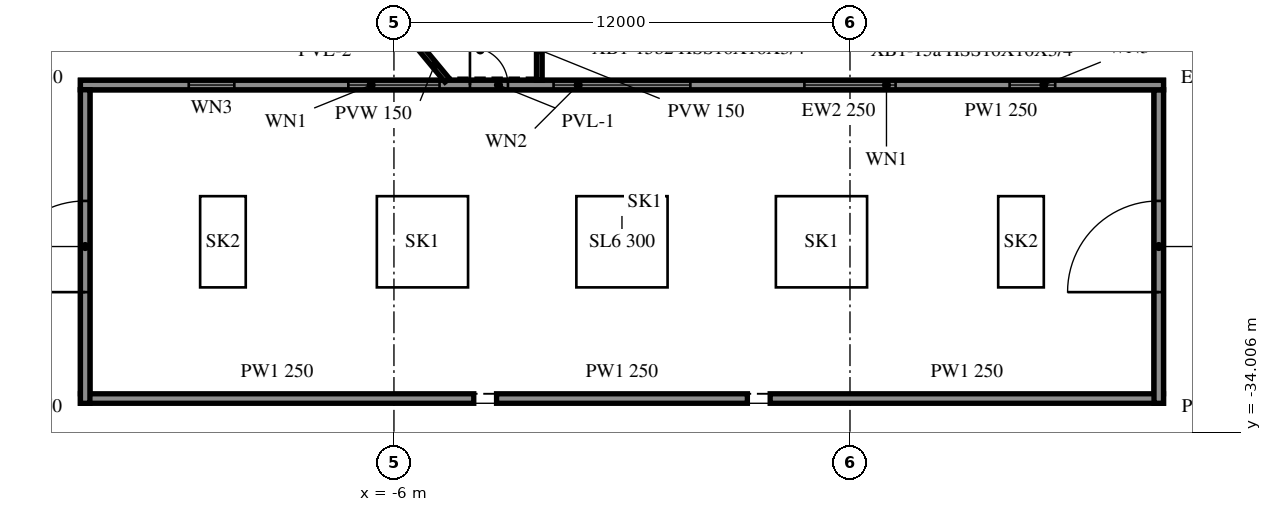
"""IFC4 building model, lengths in metres.
Left out: names, types, materials, properties, quantities, classifications, styles, units other than length and angle.
Written with IfcOpenShell. Run it as: python <this file> out.ifc"""

import sys

from ifc_helpers import new_model, si_unit, direction, frame, frame_2d, origin, origin_2d, place, context, subcontext, project, spatial, rectangle, extrude, element, fill, save


model = new_model("IFC4")
c1 = context("Model", 3, precision=1e-05, world=origin(), true_north=direction((0.0, 1.0)))
c2 = subcontext(c1, "Body", "Model", "MODEL_VIEW")
j1 = project(units=[si_unit("LENGTHUNIT", "METRE"), si_unit("PLANEANGLEUNIT", "RADIAN")], contexts=[c1])
p1 = place(None, origin())
s1 = spatial("IfcSite", under=j1, at=p1, CompositionType="ELEMENT")
p2 = place(p1, origin())
s2 = spatial("IfcBuilding", under=s1, at=p2, CompositionType="ELEMENT")
p3 = place(p2, frame((0.0, 0.0, 7.2)))
s3 = spatial("IfcBuildingStorey", under=s2, at=p3, CompositionType="ELEMENT", Elevation=7.2)
p4 = place(p3, frame((-14.25, -24.875, 0.0), z_axis=(0.0, 0.0, 1.0), x_axis=(1.0, 0.0, 0.0)))
e1 = element("IfcWall", 1, at=p4, inside=s3, PredefinedType="SOLIDWALL", context=c2, shape_type="SweptSolid", body=[
    extrude(rectangle(XDim=28.5, YDim=0.25, at=frame_2d((14.25, 0.0))), origin(), (0.0, 0.0, 1.0), 4.0),
])
p5 = place(p4, frame((2.85, 0.0, 0.9)))
e2 = element("IfcOpeningElement", 2, at=p5, cuts=e1, PredefinedType="OPENING", context=c2, shape_type="SweptSolid", body=[
    extrude(rectangle(XDim=1.2, YDim=2.0, at=frame_2d((0.6, 1.0))), frame((0.0, 0.135, 0.0), z_axis=(0.0, -1.0, 0.0), x_axis=(1.0, 0.0, 0.0)), (0.0, 0.0, 1.0), 0.27),
])
p6 = place(p4, frame((7.05, 0.0, 0.9)))
e3 = element("IfcOpeningElement", 3, at=p6, cuts=e1, PredefinedType="OPENING", context=c2, shape_type="SweptSolid", body=[
    extrude(rectangle(XDim=2.4, YDim=2.0, at=frame_2d((1.2, 1.0))), frame((0.0, 0.135, 0.0), z_axis=(0.0, -1.0, 0.0), x_axis=(1.0, 0.0, 0.0)), (0.0, 0.0, 1.0), 0.27),
])
p7 = place(p4, frame((12.45, 0.0, 0.9)))
e4 = element("IfcOpeningElement", 4, at=p7, cuts=e1, PredefinedType="OPENING", context=c2, shape_type="SweptSolid", body=[
    extrude(rectangle(XDim=3.6, YDim=2.0, at=frame_2d((1.8, 1.0))), frame((0.0, 0.135, 0.0), z_axis=(0.0, -1.0, 0.0), x_axis=(1.0, 0.0, 0.0)), (0.0, 0.0, 1.0), 0.27),
])
p8 = place(p4, frame((19.05, 0.0, 0.9)))
e5 = element("IfcOpeningElement", 5, at=p8, cuts=e1, PredefinedType="OPENING", context=c2, shape_type="SweptSolid", body=[
    extrude(rectangle(XDim=2.4, YDim=2.0, at=frame_2d((1.2, 1.0))), frame((0.0, 0.135, 0.0), z_axis=(0.0, -1.0, 0.0), x_axis=(1.0, 0.0, 0.0)), (0.0, 0.0, 1.0), 0.27),
])
p9 = place(p4, frame((24.45, 0.0, 0.9)))
e6 = element("IfcOpeningElement", 6, at=p9, cuts=e1, PredefinedType="OPENING", context=c2, shape_type="SweptSolid", body=[
    extrude(rectangle(XDim=1.2, YDim=2.0, at=frame_2d((0.6, 1.0))), frame((0.0, 0.135, 0.0), z_axis=(0.0, -1.0, 0.0), x_axis=(1.0, 0.0, 0.0)), (0.0, 0.0, 1.0), 0.27),
])
p10 = place(p4, frame((10.25, 0.0, 0.0)))
e7 = element("IfcOpeningElement", 7, at=p10, cuts=e1, PredefinedType="OPENING", context=c2, shape_type="SweptSolid", body=[
    extrude(rectangle(XDim=1.0, YDim=2.1, at=frame_2d((0.5, 1.05))), frame((0.0, 0.135, 0.0), z_axis=(0.0, -1.0, 0.0), x_axis=(1.0, 0.0, 0.0)), (0.0, 0.0, 1.0), 0.27),
])
p11 = place(p3, frame((-14.125, -33.25, 0.0), z_axis=(0.0, 0.0, 1.0), x_axis=(0.0, 1.0, 0.0)))
e8 = element("IfcWall", 8, at=p11, inside=s3, PredefinedType="SOLIDWALL", context=c2, shape_type="SweptSolid", body=[
    extrude(rectangle(XDim=8.25, YDim=0.25, at=frame_2d((4.125, 0.0))), origin(), (0.0, 0.0, 1.0), 4.0),
])
p12 = place(p11, frame((2.925, 0.0, 0.0)))
e9 = element("IfcOpeningElement", 9, at=p12, cuts=e8, PredefinedType="OPENING", context=c2, shape_type="SweptSolid", body=[
    extrude(rectangle(XDim=2.4, YDim=2.7, at=frame_2d((1.2, 1.35))), frame((0.0, 0.135, 0.0), z_axis=(0.0, -1.0, 0.0), x_axis=(1.0, 0.0, 0.0)), (0.0, 0.0, 1.0), 0.27),
])
p13 = place(p3, frame((14.125, -33.25, 0.0), z_axis=(0.0, 0.0, 1.0), x_axis=(0.0, 1.0, 0.0)))
e10 = element("IfcWall", 10, at=p13, inside=s3, PredefinedType="SOLIDWALL", context=c2, shape_type="SweptSolid", body=[
    extrude(rectangle(XDim=8.25, YDim=0.25, at=frame_2d((4.125, 0.0))), origin(), (0.0, 0.0, 1.0), 4.0),
])
p14 = place(p13, frame((2.925, 0.0, 0.0)))
e11 = element("IfcOpeningElement", 11, at=p14, cuts=e10, PredefinedType="OPENING", context=c2, shape_type="SweptSolid", body=[
    extrude(rectangle(XDim=2.4, YDim=2.7, at=frame_2d((1.2, 1.35))), frame((0.0, 0.135, 0.0), z_axis=(0.0, -1.0, 0.0), x_axis=(1.0, 0.0, 0.0)), (0.0, 0.0, 1.0), 0.27),
])
p15 = place(p3, frame((-14.25, -24.875, 4.3), z_axis=(0.0, 0.0, 1.0), x_axis=(1.0, 0.0, 0.0)))
e12 = element("IfcWall", 12, at=p15, inside=s3, PredefinedType="PARAPET", context=c2, shape_type="SweptSolid", body=[
    extrude(rectangle(XDim=28.5, YDim=0.25, at=frame_2d((14.25, 0.0))), origin(), (0.0, 0.0, 1.0), 0.6),
])
for number, where, z_axis, x_axis in (
    (13, (-14.125, -33.0, 4.3), (0.0, 0.0, 1.0), (0.0, 1.0, 0.0)),
    (14, (14.125, -33.0, 4.3), (0.0, 0.0, 1.0), (0.0, 1.0, 0.0)),
):
    element("IfcWall", number, at=place(p3, frame(where, z_axis=z_axis, x_axis=x_axis)), inside=s3, PredefinedType="PARAPET", context=c2, shape_type="SweptSolid", body=[
        extrude(rectangle(XDim=8.0, YDim=0.25, at=frame_2d((4.0, 0.0))), origin(), (0.0, 0.0, 1.0), 0.6),
    ])
p16 = place(p3, frame((-14.25, -33.125, 4.3), z_axis=(0.0, 0.0, 1.0), x_axis=(1.0, 0.0, 0.0)))
e15 = element("IfcWall", 15, at=p16, inside=s3, PredefinedType="PARAPET", context=c2, shape_type="SweptSolid", body=[
    extrude(rectangle(XDim=10.35, YDim=0.25, at=frame_2d((5.175, 0.0))), origin(), (0.0, 0.0, 1.0), 0.6),
])
p17 = place(p3, frame((-3.3, -33.125, 4.3), z_axis=(0.0, 0.0, 1.0), x_axis=(1.0, 0.0, 0.0)))
e16 = element("IfcWall", 16, at=p17, inside=s3, PredefinedType="PARAPET", context=c2, shape_type="SweptSolid", body=[
    extrude(rectangle(XDim=6.6, YDim=0.25, at=frame_2d((3.3, 0.0))), origin(), (0.0, 0.0, 1.0), 0.6),
])
p18 = place(p3, frame((3.9, -33.125, 4.3), z_axis=(0.0, 0.0, 1.0), x_axis=(1.0, 0.0, 0.0)))
e17 = element("IfcWall", 17, at=p18, inside=s3, PredefinedType="PARAPET", context=c2, shape_type="SweptSolid", body=[
    extrude(rectangle(XDim=10.35, YDim=0.25, at=frame_2d((5.175, 0.0))), origin(), (0.0, 0.0, 1.0), 0.6),
])
p19 = place(p3, frame((-4.6, -24.75, 0.0), z_axis=(0.0, 0.0, 1.0), x_axis=(-0.637776936143, 0.770221123914, 0.0)))
e18 = element("IfcWall", 18, at=p19, inside=s3, PredefinedType="SOLIDWALL", context=c2, shape_type="SweptSolid", body=[
    extrude(rectangle(XDim=2.077, YDim=0.15, at=frame_2d((1.039, 0.0))), origin(), (0.0, 0.0, 1.0), 3.8),
])
p20 = place(p3, frame((-2.175, -24.75, 0.0), z_axis=(0.0, 0.0, 1.0), x_axis=(0.0, 1.0, 0.0)))
e19 = element("IfcWall", 19, at=p20, inside=s3, PredefinedType="SOLIDWALL", context=c2, shape_type="SweptSolid", body=[
    extrude(rectangle(XDim=1.6, YDim=0.15, at=frame_2d((0.8, 0.0))), origin(), (0.0, 0.0, 1.0), 3.8),
])
p21 = place(p12, origin())
e20 = element("IfcDoor", 20, at=p21, inside=s3, OperationType="SINGLE_SWING_LEFT", PredefinedType="DOOR", context=c2, shape_type="SweptSolid", body=[
    extrude(rectangle(XDim=2.4, YDim=2.7, at=frame_2d((1.2, 1.35))), frame((0.0, 0.025, 0.0), z_axis=(0.0, -1.0, 0.0), x_axis=(1.0, 0.0, 0.0)), (0.0, 0.0, 1.0), 0.05),
])
fill(e9, e20)
p22 = place(p14, origin())
e21 = element("IfcDoor", 21, at=p22, inside=s3, OperationType="SINGLE_SWING_LEFT", PredefinedType="DOOR", context=c2, shape_type="SweptSolid", body=[
    extrude(rectangle(XDim=2.4, YDim=2.7, at=frame_2d((1.2, 1.35))), frame((0.0, 0.025, 0.0), z_axis=(0.0, -1.0, 0.0), x_axis=(1.0, 0.0, 0.0)), (0.0, 0.0, 1.0), 0.05),
])
fill(e11, e21)
p23 = place(p5, origin())
e22 = element("IfcWindow", 22, at=p23, inside=s3, PartitioningType="SINGLE_PANEL", PredefinedType="WINDOW", context=c2, shape_type="SweptSolid", body=[
    extrude(rectangle(XDim=1.2, YDim=2.0, at=frame_2d((0.6, 1.0))), frame((0.0, 0.03, 0.0), z_axis=(0.0, -1.0, 0.0), x_axis=(1.0, 0.0, 0.0)), (0.0, 0.0, 1.0), 0.06),
])
fill(e2, e22)
p24 = place(p6, origin())
e23 = element("IfcWindow", 23, at=p24, inside=s3, PartitioningType="SINGLE_PANEL", PredefinedType="WINDOW", context=c2, shape_type="SweptSolid", body=[
    extrude(rectangle(XDim=2.4, YDim=2.0, at=frame_2d((1.2, 1.0))), frame((0.0, 0.03, 0.0), z_axis=(0.0, -1.0, 0.0), x_axis=(1.0, 0.0, 0.0)), (0.0, 0.0, 1.0), 0.06),
])
fill(e3, e23)
p25 = place(p7, origin())
e24 = element("IfcWindow", 24, at=p25, inside=s3, PartitioningType="SINGLE_PANEL", PredefinedType="WINDOW", context=c2, shape_type="SweptSolid", body=[
    extrude(rectangle(XDim=3.6, YDim=2.0, at=frame_2d((1.8, 1.0))), frame((0.0, 0.03, 0.0), z_axis=(0.0, -1.0, 0.0), x_axis=(1.0, 0.0, 0.0)), (0.0, 0.0, 1.0), 0.06),
])
fill(e4, e24)
p26 = place(p8, origin())
e25 = element("IfcWindow", 25, at=p26, inside=s3, PartitioningType="SINGLE_PANEL", PredefinedType="WINDOW", context=c2, shape_type="SweptSolid", body=[
    extrude(rectangle(XDim=2.4, YDim=2.0, at=frame_2d((1.2, 1.0))), frame((0.0, 0.03, 0.0), z_axis=(0.0, -1.0, 0.0), x_axis=(1.0, 0.0, 0.0)), (0.0, 0.0, 1.0), 0.06),
])
fill(e5, e25)
p27 = place(p9, origin())
e26 = element("IfcWindow", 26, at=p27, inside=s3, PartitioningType="SINGLE_PANEL", PredefinedType="WINDOW", context=c2, shape_type="SweptSolid", body=[
    extrude(rectangle(XDim=1.2, YDim=2.0, at=frame_2d((0.6, 1.0))), frame((0.0, 0.03, 0.0), z_axis=(0.0, -1.0, 0.0), x_axis=(1.0, 0.0, 0.0)), (0.0, 0.0, 1.0), 0.06),
])
fill(e6, e26)
p28 = place(p3, frame((0.0, 0.0, 4.0)))
p29 = place(p28, frame((-10.5, -29.0, -0.01)))
p30 = place(p29, frame((0.0, 0.0, 0.26)))
e27 = element("IfcWindow", 27, at=p30, inside=s3, PartitioningType="SINGLE_PANEL", PredefinedType="SKYLIGHT", context=c2, shape_type="SweptSolid", body=[
    extrude(rectangle(XDim=1.2, YDim=2.4, at=origin_2d()), origin(), (0.0, 0.0, 1.0), 0.05),
])
p31 = place(p28, frame((-5.25, -29.0, -0.01)))
p32 = place(p31, frame((0.0, 0.0, 0.26)))
e28 = element("IfcWindow", 28, at=p32, inside=s3, PartitioningType="SINGLE_PANEL", PredefinedType="SKYLIGHT", context=c2, shape_type="SweptSolid", body=[
    extrude(rectangle(XDim=2.4, YDim=2.4, at=origin_2d()), origin(), (0.0, 0.0, 1.0), 0.05),
])
p33 = place(p28, frame((0.0, -29.0, -0.01)))
p34 = place(p33, frame((0.0, 0.0, 0.26)))
e29 = element("IfcWindow", 29, at=p34, inside=s3, PartitioningType="SINGLE_PANEL", PredefinedType="SKYLIGHT", context=c2, shape_type="SweptSolid", body=[
    extrude(rectangle(XDim=2.4, YDim=2.4, at=origin_2d()), origin(), (0.0, 0.0, 1.0), 0.05),
])
p35 = place(p28, frame((5.25, -29.0, -0.01)))
p36 = place(p35, frame((0.0, 0.0, 0.26)))
e30 = element("IfcWindow", 30, at=p36, inside=s3, PartitioningType="SINGLE_PANEL", PredefinedType="SKYLIGHT", context=c2, shape_type="SweptSolid", body=[
    extrude(rectangle(XDim=2.4, YDim=2.4, at=origin_2d()), origin(), (0.0, 0.0, 1.0), 0.05),
])
p37 = place(p28, frame((10.5, -29.0, -0.01)))
p38 = place(p37, frame((0.0, 0.0, 0.26)))
e31 = element("IfcWindow", 31, at=p38, inside=s3, PartitioningType="SINGLE_PANEL", PredefinedType="SKYLIGHT", context=c2, shape_type="SweptSolid", body=[
    extrude(rectangle(XDim=1.2, YDim=2.4, at=origin_2d()), origin(), (0.0, 0.0, 1.0), 0.05),
])
p39 = place(p10, origin())
e32 = element("IfcDoor", 32, at=p39, inside=s3, OperationType="SINGLE_SWING_LEFT", PredefinedType="DOOR", context=c2, shape_type="SweptSolid", body=[
    extrude(rectangle(XDim=1.0, YDim=2.1, at=frame_2d((0.5, 1.05))), frame((0.0, 0.025, 0.0), z_axis=(0.0, -1.0, 0.0), x_axis=(1.0, 0.0, 0.0)), (0.0, 0.0, 1.0), 0.05),
])
fill(e7, e32)
save(model, sys.argv[1])
